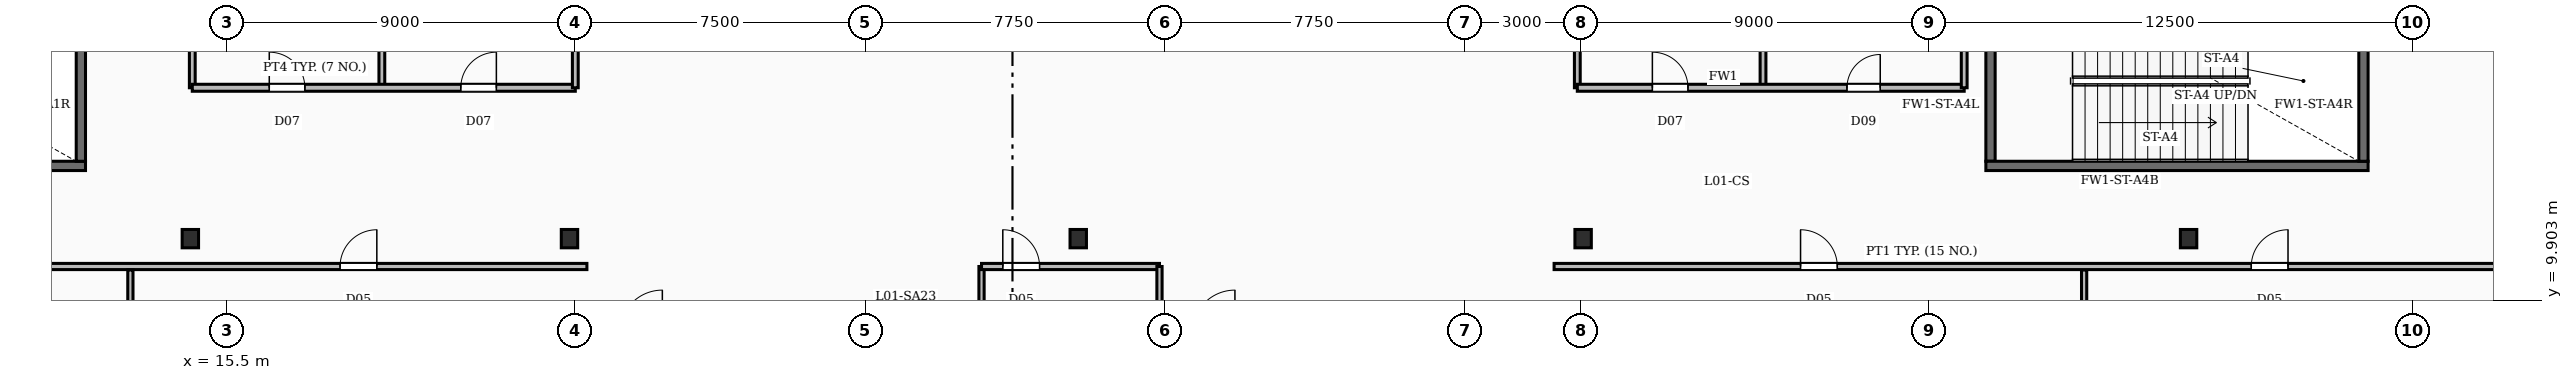
"""IFC4 building model, lengths in metres.
Left out: names, types, materials, properties, quantities, classifications, styles, units other than length and angle.
Written with IfcOpenShell. Run it as: python <this file> out.ifc"""

import sys

from ifc_helpers import new_model, si_unit, direction, frame, frame_2d, origin, origin_2d, place, context, subcontext, project, spatial, rectangle, i_section, extrude, element, fill, save


model = new_model("IFC4")
c1 = context("Model", 3, precision=1e-05, world=origin(), true_north=direction((0.0, 1.0)))
c2 = subcontext(c1, "Body", "Model", "MODEL_VIEW")
j1 = project(units=[si_unit("LENGTHUNIT", "METRE"), si_unit("PLANEANGLEUNIT", "RADIAN")], contexts=[c1])
p1 = place(None, origin())
s1 = spatial("IfcSite", under=j1, at=p1, CompositionType="ELEMENT")
p2 = place(p1, origin())
s2 = spatial("IfcBuilding", under=s1, at=p2, CompositionType="ELEMENT")
p3 = place(p2, frame((0.0, 0.0, 8.0)))
s3 = spatial("IfcBuildingStorey", under=s2, at=p3, CompositionType="ELEMENT", Elevation=8.0)
for number, where, z_axis, x_axis in (
    (1, (14.55, 11.5, -0.35), (0.0, 0.0, 1.0), (1.0, 0.0, 0.0)),
    (2, (24.35, 11.5, -0.35), (0.0, 0.0, 1.0), (1.0, 0.0, 0.0)),
    (3, (37.5, 11.5, -0.35), (0.0, 0.0, 1.0), (1.0, 0.0, 0.0)),
    (4, (50.55, 11.5, -0.35), (0.0, 0.0, 1.0), (1.0, 0.0, 0.0)),
    (5, (66.2, 11.5, -0.35), (0.0, 0.0, 1.0), (1.0, 0.0, 0.0)),
):
    element("IfcColumn", number, at=place(p3, frame(where, z_axis=z_axis, x_axis=x_axis)), inside=s3, PredefinedType="COLUMN", context=c2, shape_type="SweptSolid", body=[
        extrude(i_section(OverallWidth=0.424, OverallDepth=0.474, WebThickness=0.048, FlangeThickness=0.077, FilletRadius=0.02, at=origin_2d()), origin(), (0.0, 0.0, 1.0), 5.0),
    ])
p4 = place(p3, frame((1.96, 13.38, 0.0), z_axis=(0.0, 0.0, 1.0), x_axis=(1.0, 0.0, 0.0)))
e6 = element("IfcWall", 6, at=p4, inside=s3, PredefinedType="SOLIDWALL", context=c2, shape_type="SweptSolid", body=[
    extrude(rectangle(XDim=9.88, YDim=0.24, at=frame_2d((4.94, 0.0))), origin(), (0.0, 0.0, 1.0), 4.65),
])
p5 = place(p3, frame((11.72, 13.5, 0.0), z_axis=(0.0, 0.0, 1.0), x_axis=(0.0, 1.0, 0.0)))
e7 = element("IfcWall", 7, at=p5, inside=s3, PredefinedType="SOLIDWALL", context=c2, shape_type="SweptSolid", body=[
    extrude(rectangle(XDim=4.15, YDim=0.24, at=frame_2d((2.075, 0.0))), origin(), (0.0, 0.0, 1.0), 4.65),
])
p6 = place(p3, frame((60.96, 13.38, 0.0), z_axis=(0.0, 0.0, 1.0), x_axis=(1.0, 0.0, 0.0)))
e8 = element("IfcWall", 8, at=p6, inside=s3, PredefinedType="SOLIDWALL", context=c2, shape_type="SweptSolid", body=[
    extrude(rectangle(XDim=9.88, YDim=0.24, at=frame_2d((4.94, 0.0))), origin(), (0.0, 0.0, 1.0), 4.65),
])
for number, where, z_axis, x_axis in (
    (9, (61.08, 13.5, 0.0), (0.0, 0.0, 1.0), (0.0, 1.0, 0.0)),
    (10, (70.72, 13.5, 0.0), (0.0, 0.0, 1.0), (0.0, 1.0, 0.0)),
):
    element("IfcWall", number, at=place(p3, frame(where, z_axis=z_axis, x_axis=x_axis)), inside=s3, PredefinedType="SOLIDWALL", context=c2, shape_type="SweptSolid", body=[
        extrude(rectangle(XDim=4.15, YDim=0.24, at=frame_2d((2.075, 0.0))), origin(), (0.0, 0.0, 1.0), 4.65),
    ])
p7 = place(p3, frame((19.5, 15.4, 0.0), z_axis=(0.0, 0.0, 1.0), x_axis=(0.0, 1.0, 0.0)))
e11 = element("IfcWall", 11, at=p7, inside=s3, PredefinedType="PARTITIONING", context=c2, shape_type="SweptSolid", body=[
    extrude(rectangle(XDim=3.58, YDim=0.15, at=frame_2d((1.79, 0.0))), origin(), (0.0, 0.0, 1.0), 3.71),
])
p8 = place(p3, frame((14.6, 15.4, 0.0), z_axis=(0.0, 0.0, 1.0), x_axis=(1.0, 0.0, 0.0)))
e12 = element("IfcWall", 12, at=p8, inside=s3, PredefinedType="PARTITIONING", context=c2, shape_type="SweptSolid", body=[
    extrude(rectangle(XDim=9.9, YDim=0.18, at=frame_2d((4.95, 0.0))), origin(), (0.0, 0.0, 1.0), 3.71),
])
p9 = place(p8, frame((1.99, 0.0, 0.0)))
e13 = element("IfcOpeningElement", 13, at=p9, cuts=e12, PredefinedType="OPENING", context=c2, shape_type="SweptSolid", body=[
    extrude(rectangle(XDim=0.92, YDim=2.1, at=frame_2d((0.46, 1.05))), frame((0.0, 0.1, 0.0), z_axis=(0.0, -1.0, 0.0), x_axis=(1.0, 0.0, 0.0)), (0.0, 0.0, 1.0), 0.2),
])
p10 = place(p8, frame((6.94, 0.0, 0.0)))
e14 = element("IfcOpeningElement", 14, at=p10, cuts=e12, PredefinedType="OPENING", context=c2, shape_type="SweptSolid", body=[
    extrude(rectangle(XDim=0.92, YDim=2.1, at=frame_2d((0.46, 1.05))), frame((0.0, 0.1, 0.0), z_axis=(0.0, -1.0, 0.0), x_axis=(1.0, 0.0, 0.0)), (0.0, 0.0, 1.0), 0.2),
])
for number, where, z_axis, x_axis in (
    (15, (14.6, 15.4, 0.0), (0.0, 0.0, 1.0), (0.0, 1.0, 0.0)),
    (16, (24.5, 15.4, 0.0), (0.0, 0.0, 1.0), (0.0, 1.0, 0.0)),
    (17, (55.2, 15.4, 0.0), (0.0, 0.0, 1.0), (0.0, 1.0, 0.0)),
):
    element("IfcWall", number, at=place(p3, frame(where, z_axis=z_axis, x_axis=x_axis)), inside=s3, PredefinedType="PARTITIONING", context=c2, shape_type="SweptSolid", body=[
        extrude(rectangle(XDim=3.58, YDim=0.15, at=frame_2d((1.79, 0.0))), origin(), (0.0, 0.0, 1.0), 3.71),
    ])
p11 = place(p3, frame((50.4, 15.4, 0.0), z_axis=(0.0, 0.0, 1.0), x_axis=(1.0, 0.0, 0.0)))
e18 = element("IfcWall", 18, at=p11, inside=s3, PredefinedType="SOLIDWALL", context=c2, shape_type="SweptSolid", body=[
    extrude(rectangle(XDim=10.0, YDim=0.18, at=frame_2d((5.0, 0.0))), origin(), (0.0, 0.0, 1.0), 3.71),
])
p12 = place(p11, frame((1.94, 0.0, 0.0)))
e19 = element("IfcOpeningElement", 19, at=p12, cuts=e18, PredefinedType="OPENING", context=c2, shape_type="SweptSolid", body=[
    extrude(rectangle(XDim=0.92, YDim=2.1, at=frame_2d((0.46, 1.05))), frame((0.0, 0.1, 0.0), z_axis=(0.0, -1.0, 0.0), x_axis=(1.0, 0.0, 0.0)), (0.0, 0.0, 1.0), 0.2),
])
p13 = place(p11, frame((6.97, 0.0, 0.0)))
e20 = element("IfcOpeningElement", 20, at=p13, cuts=e18, PredefinedType="OPENING", context=c2, shape_type="SweptSolid", body=[
    extrude(rectangle(XDim=0.86, YDim=2.05, at=frame_2d((0.43, 1.025))), frame((0.0, 0.1, 0.0), z_axis=(0.0, -1.0, 0.0), x_axis=(1.0, 0.0, 0.0)), (0.0, 0.0, 1.0), 0.2),
])
for number, where, z_axis, x_axis in (
    (21, (50.4, 15.4, 0.0), (0.0, 0.0, 1.0), (0.0, 1.0, 0.0)),
    (22, (60.4, 15.4, 0.0), (0.0, 0.0, 1.0), (0.0, 1.0, 0.0)),
):
    element("IfcWall", number, at=place(p3, frame(where, z_axis=z_axis, x_axis=x_axis)), inside=s3, PredefinedType="PARTITIONING", context=c2, shape_type="SweptSolid", body=[
        extrude(rectangle(XDim=3.58, YDim=0.15, at=frame_2d((1.79, 0.0))), origin(), (0.0, 0.0, 1.0), 3.71),
    ])
p14 = place(p3, frame((13.0, 0.0, 0.0), z_axis=(0.0, 0.0, 1.0), x_axis=(0.0, 1.0, 0.0)))
e23 = element("IfcWall", 23, at=p14, inside=s3, PredefinedType="PARTITIONING", context=c2, shape_type="SweptSolid", body=[
    extrude(rectangle(XDim=10.69, YDim=0.135, at=frame_2d((5.345, 0.0))), origin(), (0.0, 0.0, 1.0), 3.71),
])
p15 = place(p14, frame((2.2, 0.0, 0.0)))
e24 = element("IfcOpeningElement", 24, at=p15, cuts=e23, PredefinedType="OPENING", context=c2, shape_type="SweptSolid", body=[
    extrude(rectangle(XDim=0.95, YDim=2.15, at=frame_2d((0.475, 1.075))), frame((0.0, 0.077, 0.0), z_axis=(0.0, -1.0, 0.0), x_axis=(1.0, 0.0, 0.0)), (0.0, 0.0, 1.0), 0.155),
])
p16 = place(p3, frame((0.0, 10.78, 0.0), z_axis=(0.0, 0.0, 1.0), x_axis=(1.0, 0.0, 0.0)))
e25 = element("IfcWall", 25, at=p16, inside=s3, PredefinedType="PARTITIONING", context=c2, shape_type="SweptSolid", body=[
    extrude(rectangle(XDim=24.8, YDim=0.16, at=frame_2d((12.4, 0.0))), origin(), (0.0, 0.0, 1.0), 3.71),
])
p17 = place(p16, frame((18.42, 0.0, 0.0)))
e26 = element("IfcOpeningElement", 26, at=p17, cuts=e25, PredefinedType="OPENING", context=c2, shape_type="SweptSolid", body=[
    extrude(rectangle(XDim=0.95, YDim=2.15, at=frame_2d((0.475, 1.075))), frame((0.0, 0.09, 0.0), z_axis=(0.0, -1.0, 0.0), x_axis=(1.0, 0.0, 0.0)), (0.0, 0.0, 1.0), 0.18),
])
p18 = place(p3, frame((63.5, 0.0, 0.0), z_axis=(0.0, 0.0, 1.0), x_axis=(0.0, 1.0, 0.0)))
e27 = element("IfcWall", 27, at=p18, inside=s3, PredefinedType="PARTITIONING", context=c2, shape_type="SweptSolid", body=[
    extrude(rectangle(XDim=10.69, YDim=0.135, at=frame_2d((5.345, 0.0))), origin(), (0.0, 0.0, 1.0), 3.71),
])
p19 = place(p18, frame((2.2, 0.0, 0.0)))
e28 = element("IfcOpeningElement", 28, at=p19, cuts=e27, PredefinedType="OPENING", context=c2, shape_type="SweptSolid", body=[
    extrude(rectangle(XDim=0.95, YDim=2.15, at=frame_2d((0.475, 1.075))), frame((0.0, 0.077, 0.0), z_axis=(0.0, -1.0, 0.0), x_axis=(1.0, 0.0, 0.0)), (0.0, 0.0, 1.0), 0.155),
])
p20 = place(p3, frame((49.8, 10.78, 0.0), z_axis=(0.0, 0.0, 1.0), x_axis=(1.0, 0.0, 0.0)))
e29 = element("IfcWall", 29, at=p20, inside=s3, PredefinedType="PARTITIONING", context=c2, shape_type="SweptSolid", body=[
    extrude(rectangle(XDim=29.7, YDim=0.16, at=frame_2d((14.85, 0.0))), origin(), (0.0, 0.0, 1.0), 3.71),
])
p21 = place(p20, frame((6.37, 0.0, 0.0)))
e30 = element("IfcOpeningElement", 30, at=p21, cuts=e29, PredefinedType="OPENING", context=c2, shape_type="SweptSolid", body=[
    extrude(rectangle(XDim=0.95, YDim=2.15, at=frame_2d((0.475, 1.075))), frame((0.0, 0.09, 0.0), z_axis=(0.0, -1.0, 0.0), x_axis=(1.0, 0.0, 0.0)), (0.0, 0.0, 1.0), 0.18),
])
p22 = place(p20, frame((18.02, 0.0, 0.0)))
e31 = element("IfcOpeningElement", 31, at=p22, cuts=e29, PredefinedType="OPENING", context=c2, shape_type="SweptSolid", body=[
    extrude(rectangle(XDim=0.95, YDim=2.15, at=frame_2d((0.475, 1.075))), frame((0.0, 0.09, 0.0), z_axis=(0.0, -1.0, 0.0), x_axis=(1.0, 0.0, 0.0)), (0.0, 0.0, 1.0), 0.18),
])
p23 = place(p3, frame((35.0, 10.78, 0.0), z_axis=(0.0, 0.0, 1.0), x_axis=(1.0, 0.0, 0.0)))
e32 = element("IfcWall", 32, at=p23, inside=s3, PredefinedType="PARTITIONING", context=c2, shape_type="SweptSolid", body=[
    extrude(rectangle(XDim=4.6, YDim=0.16, at=frame_2d((2.3, 0.0))), origin(), (0.0, 0.0, 1.0), 3.71),
])
p24 = place(p23, frame((0.55, 0.0, 0.0)))
e33 = element("IfcOpeningElement", 33, at=p24, cuts=e32, PredefinedType="OPENING", context=c2, shape_type="SweptSolid", body=[
    extrude(rectangle(XDim=0.95, YDim=2.15, at=frame_2d((0.475, 1.075))), frame((0.0, 0.09, 0.0), z_axis=(0.0, -1.0, 0.0), x_axis=(1.0, 0.0, 0.0)), (0.0, 0.0, 1.0), 0.18),
])
for number, where, z_axis, x_axis in (
    (34, (35.0, 0.0, 0.0), (0.0, 0.0, 1.0), (0.0, 1.0, 0.0)),
    (35, (39.6, 0.0, 0.0), (0.0, 0.0, 1.0), (0.0, 1.0, 0.0)),
):
    element("IfcWall", number, at=place(p3, frame(where, z_axis=z_axis, x_axis=x_axis)), inside=s3, PredefinedType="PARTITIONING", context=c2, shape_type="SweptSolid", body=[
        extrude(rectangle(XDim=10.78, YDim=0.135, at=frame_2d((5.39, 0.0))), origin(), (0.0, 0.0, 1.0), 3.71),
    ])
p25 = place(p9, origin())
e36 = element("IfcDoor", 36, at=p25, inside=s3, OperationType="SINGLE_SWING_LEFT", PredefinedType="DOOR", context=c2, shape_type="SweptSolid", body=[
    extrude(rectangle(XDim=0.92, YDim=2.1, at=frame_2d((0.46, 1.05))), frame((0.0, 0.025, 0.0), z_axis=(0.0, -1.0, 0.0), x_axis=(1.0, 0.0, 0.0)), (0.0, 0.0, 1.0), 0.05),
])
fill(e13, e36)
p26 = place(p10, origin())
e37 = element("IfcDoor", 37, at=p26, inside=s3, OperationType="SINGLE_SWING_RIGHT", PredefinedType="DOOR", context=c2, shape_type="SweptSolid", body=[
    extrude(rectangle(XDim=0.92, YDim=2.1, at=frame_2d((0.46, 1.05))), frame((0.0, 0.025, 0.0), z_axis=(0.0, -1.0, 0.0), x_axis=(1.0, 0.0, 0.0)), (0.0, 0.0, 1.0), 0.05),
])
fill(e14, e37)
p27 = place(p12, origin())
e38 = element("IfcDoor", 38, at=p27, inside=s3, OperationType="SINGLE_SWING_LEFT", PredefinedType="DOOR", context=c2, shape_type="SweptSolid", body=[
    extrude(rectangle(XDim=0.92, YDim=2.1, at=frame_2d((0.46, 1.05))), frame((0.0, 0.025, 0.0), z_axis=(0.0, -1.0, 0.0), x_axis=(1.0, 0.0, 0.0)), (0.0, 0.0, 1.0), 0.05),
])
fill(e19, e38)
p28 = place(p13, origin())
e39 = element("IfcDoor", 39, at=p28, inside=s3, OperationType="SINGLE_SWING_RIGHT", PredefinedType="DOOR", context=c2, shape_type="SweptSolid", body=[
    extrude(rectangle(XDim=0.86, YDim=2.05, at=frame_2d((0.43, 1.025))), frame((0.0, 0.025, 0.0), z_axis=(0.0, -1.0, 0.0), x_axis=(1.0, 0.0, 0.0)), (0.0, 0.0, 1.0), 0.05),
])
fill(e20, e39)
p29 = place(p17, origin())
e40 = element("IfcDoor", 40, at=p29, inside=s3, OperationType="SINGLE_SWING_RIGHT", PredefinedType="DOOR", context=c2, shape_type="SweptSolid", body=[
    extrude(rectangle(XDim=0.95, YDim=2.15, at=frame_2d((0.475, 1.075))), frame((0.0, 0.025, 0.0), z_axis=(0.0, -1.0, 0.0), x_axis=(1.0, 0.0, 0.0)), (0.0, 0.0, 1.0), 0.05),
])
fill(e26, e40)
p30 = place(p21, origin())
e41 = element("IfcDoor", 41, at=p30, inside=s3, OperationType="SINGLE_SWING_LEFT", PredefinedType="DOOR", context=c2, shape_type="SweptSolid", body=[
    extrude(rectangle(XDim=0.95, YDim=2.15, at=frame_2d((0.475, 1.075))), frame((0.0, 0.025, 0.0), z_axis=(0.0, -1.0, 0.0), x_axis=(1.0, 0.0, 0.0)), (0.0, 0.0, 1.0), 0.05),
])
fill(e30, e41)
p31 = place(p22, origin())
e42 = element("IfcDoor", 42, at=p31, inside=s3, OperationType="SINGLE_SWING_RIGHT", PredefinedType="DOOR", context=c2, shape_type="SweptSolid", body=[
    extrude(rectangle(XDim=0.95, YDim=2.15, at=frame_2d((0.475, 1.075))), frame((0.0, 0.025, 0.0), z_axis=(0.0, -1.0, 0.0), x_axis=(1.0, 0.0, 0.0)), (0.0, 0.0, 1.0), 0.05),
])
fill(e31, e42)
p32 = place(p24, origin())
e43 = element("IfcDoor", 43, at=p32, inside=s3, OperationType="SINGLE_SWING_LEFT", PredefinedType="DOOR", context=c2, shape_type="SweptSolid", body=[
    extrude(rectangle(XDim=0.95, YDim=2.15, at=frame_2d((0.475, 1.075))), frame((0.0, 0.025, 0.0), z_axis=(0.0, -1.0, 0.0), x_axis=(1.0, 0.0, 0.0)), (0.0, 0.0, 1.0), 0.05),
])
fill(e33, e43)
save(model, sys.argv[1])
